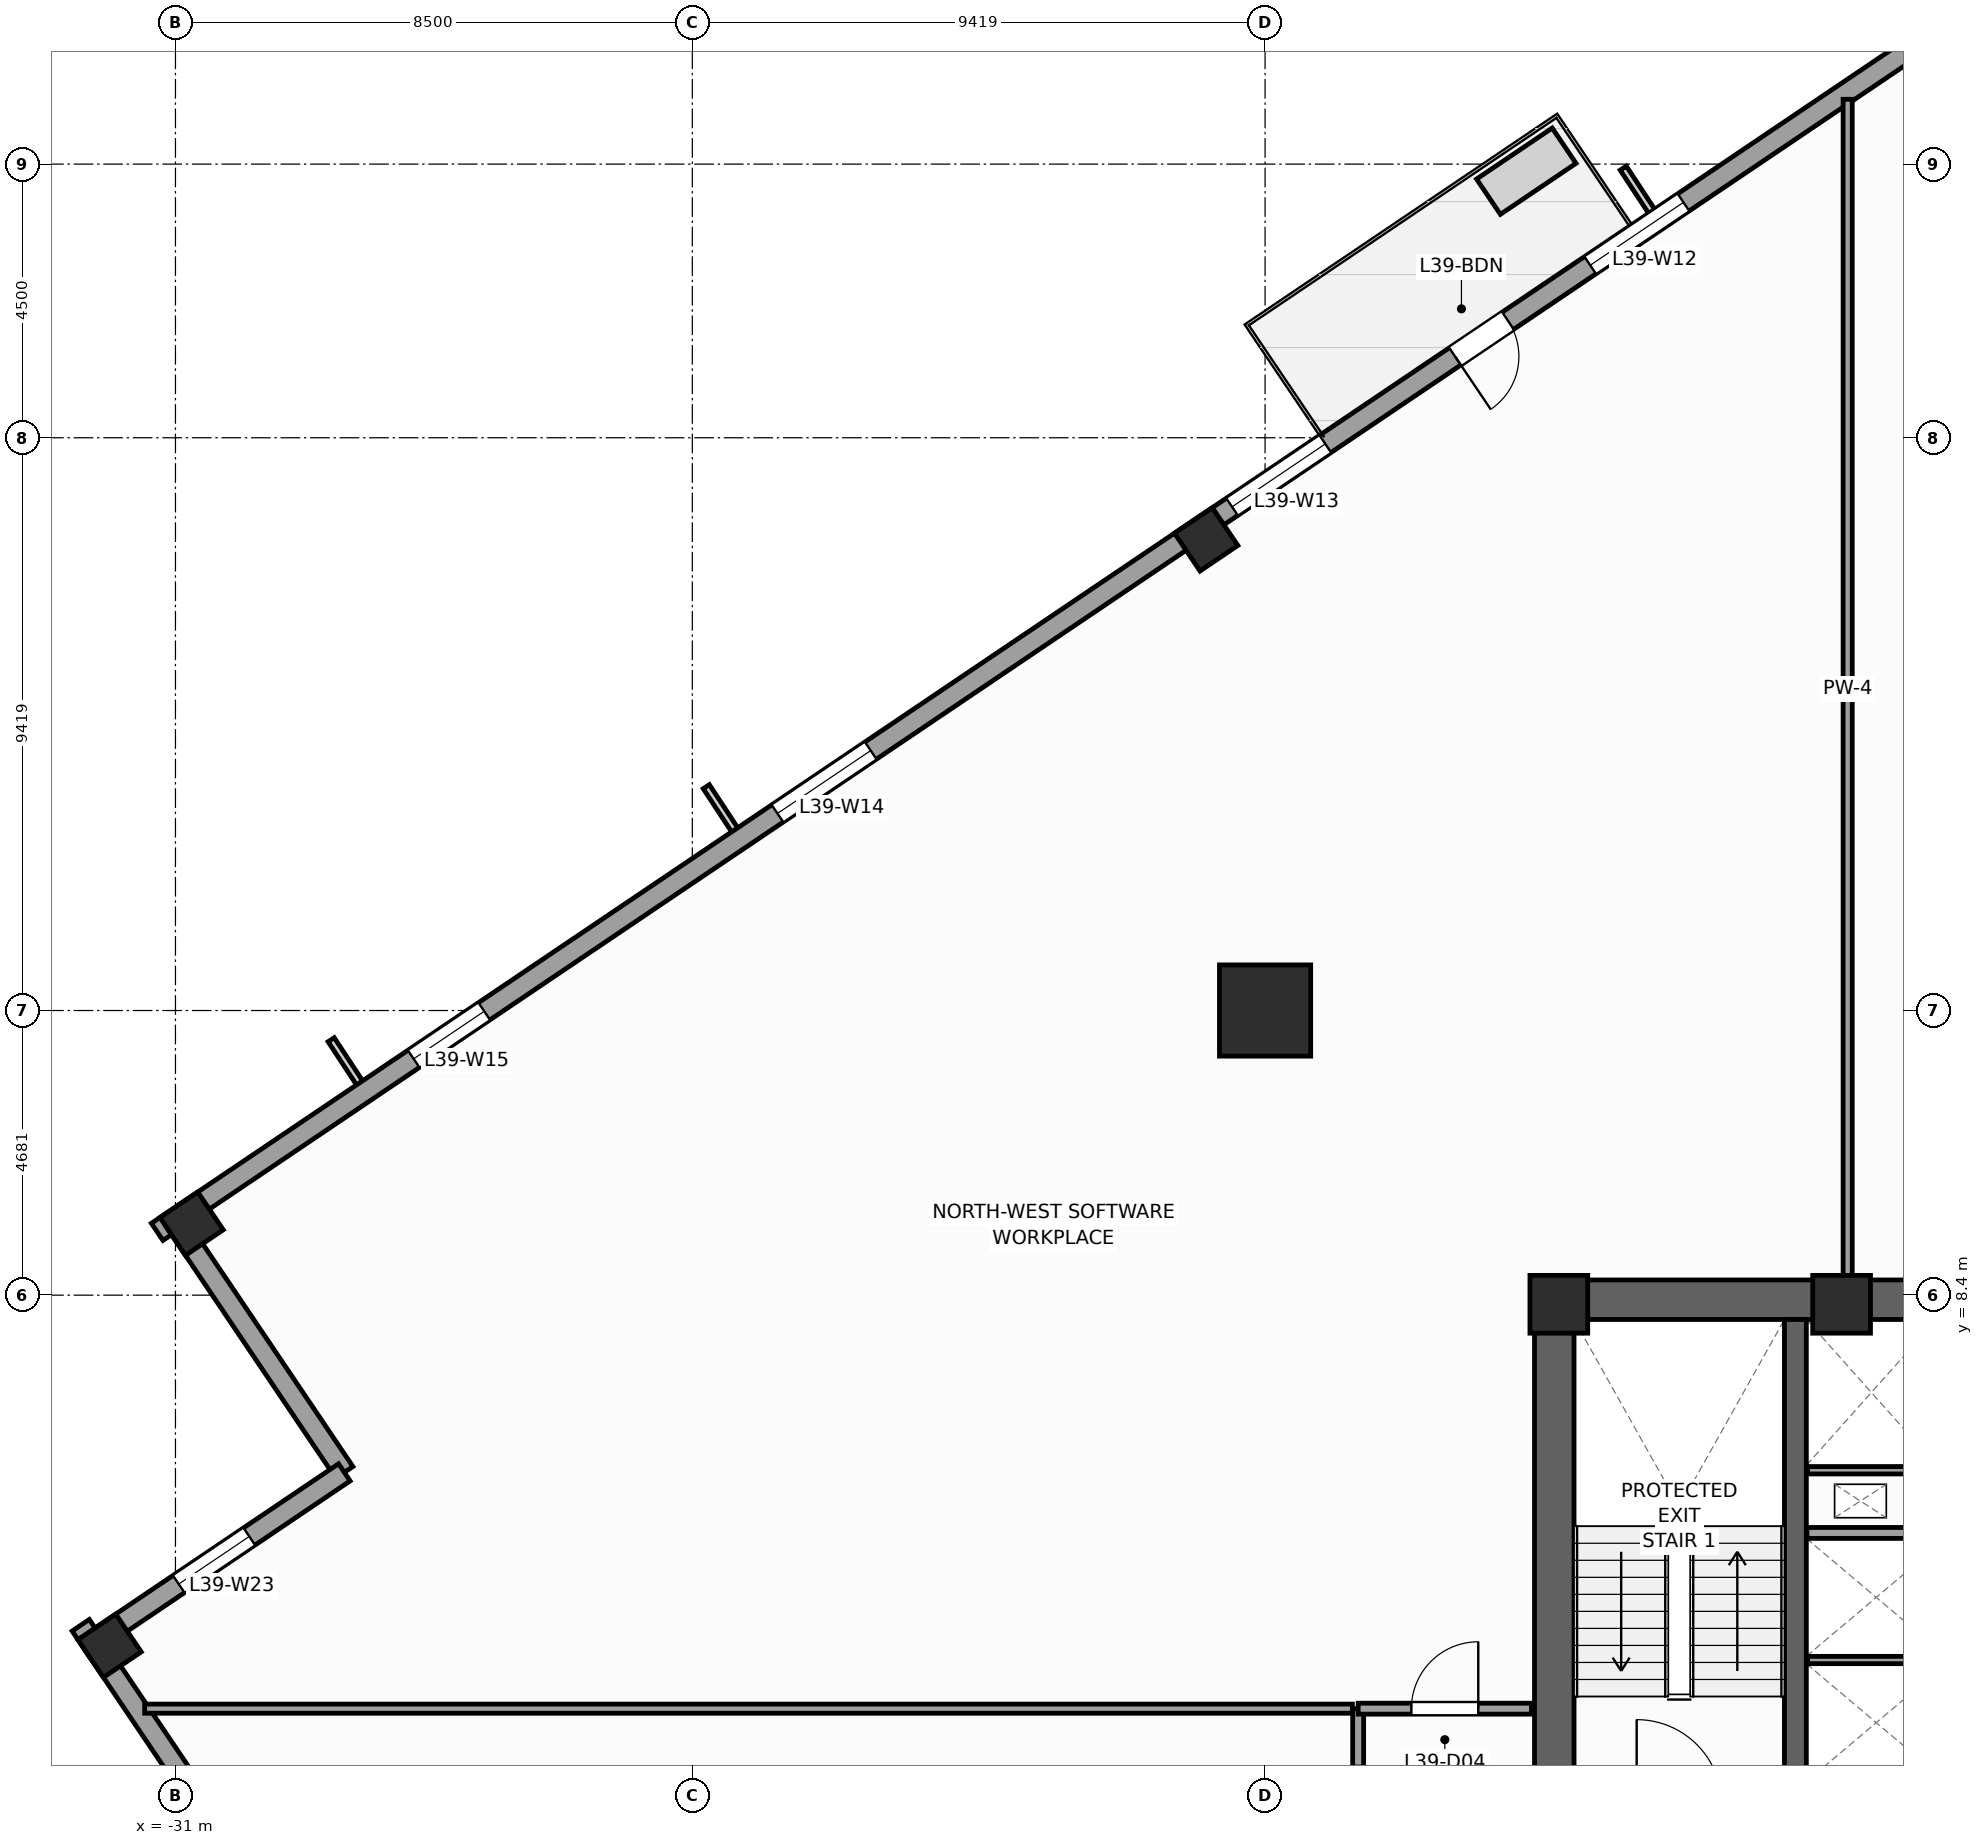
"""IFC4 building model, lengths in metres.
Left out: names, types, materials, properties, quantities, classifications, styles, units other than length and angle.
Written with IfcOpenShell. Run it as: python <this file> out.ifc"""

import sys

from ifc_helpers import new_model, si_unit, direction, frame, frame_2d, origin, origin_2d, place, context, subcontext, project, spatial, rectangle, extrude, source, transform, mapped, element, fill, save


model = new_model("IFC4")
c1 = context("Model", 3, precision=1e-05, world=origin(), true_north=direction((0.0, 1.0)))
c2 = subcontext(c1, "Body", "Model", "MODEL_VIEW")
j1 = project(units=[si_unit("LENGTHUNIT", "METRE"), si_unit("PLANEANGLEUNIT", "RADIAN")], contexts=[c1])
p1 = place(None, origin())
s1 = spatial("IfcSite", under=j1, at=p1, CompositionType="ELEMENT")
p2 = place(p1, origin())
s2 = spatial("IfcBuilding", under=s1, at=p2, CompositionType="ELEMENT")
p3 = place(p2, frame((0.0, 0.0, 164.4)))
s3 = spatial("IfcBuildingStorey", under=s2, at=p3, CompositionType="ELEMENT", Elevation=164.4)
p4 = place(p3, frame((-8.65, 8.325, 0.0), z_axis=(0.0, 0.0, 1.0), x_axis=(1.0, 0.0, 0.0)))
e1 = element("IfcWall", 1, at=p4, inside=s3, PredefinedType="SHEAR", context=c2, shape_type="SweptSolid", body=[
    extrude(rectangle(XDim=17.3, YDim=0.65, at=frame_2d((8.65, 0.0))), origin(), (0.0, 0.0, 1.0), 4.0),
])
p5 = place(p3, frame((-8.325, -8.0, 0.0), z_axis=(0.0, 0.0, 1.0), x_axis=(0.0, 1.0, 0.0)))
e2 = element("IfcWall", 2, at=p5, inside=s3, PredefinedType="SHEAR", context=c2, shape_type="SweptSolid", body=[
    extrude(rectangle(XDim=16.0, YDim=0.65, at=frame_2d((8.0, 0.0))), origin(), (0.0, 0.0, 1.0), 4.0),
])
p6 = place(p5, frame((4.69, 0.0, 0.0)))
e3 = element("IfcOpeningElement", 3, at=p6, cuts=e2, PredefinedType="OPENING", context=c2, shape_type="SweptSolid", body=[
    extrude(rectangle(XDim=1.3, YDim=2.2, at=frame_2d((0.65, 1.1))), frame((0.0, 0.335, 0.0), z_axis=(0.0, -1.0, 0.0), x_axis=(1.0, 0.0, 0.0)), (0.0, 0.0, 1.0), 0.67),
])
p7 = place(p3, frame((-4.36, -8.0, 0.0), z_axis=(0.0, 0.0, 1.0), x_axis=(0.0, 1.0, 0.0)))
e4 = element("IfcWall", 4, at=p7, inside=s3, PredefinedType="SHEAR", context=c2, shape_type="SweptSolid", body=[
    extrude(rectangle(XDim=16.0, YDim=0.36, at=frame_2d((8.0, 0.0))), origin(), (0.0, 0.0, 1.0), 4.0),
])
m1 = source(origin(), c2, "Body", "SweptSolid", [
    extrude(rectangle(XDim=0.95, YDim=0.95, at=origin_2d()), origin(), (0.0, 0.0, 1.0), 4.0),
])
for number, where, z_axis, x_axis in (
    (5, (-8.25, 8.25, 0.0), (0.0, 0.0, 1.0), (1.0, 0.0, 0.0)),
    (6, (-3.6, 8.25, 0.0), (0.0, 0.0, 1.0), (1.0, 0.0, 0.0)),
):
    element("IfcColumn", number, at=place(p3, frame(where, z_axis=z_axis, x_axis=x_axis)), inside=s3, PredefinedType="PILASTER", context=c2, shape_type="MappedRepresentation", body=[
        mapped(m1, transform((0.0, 0.0, 0.0), scale=1.0)),
    ])
m2 = source(origin(), c2, "Body", "SweptSolid", [
    extrude(rectangle(XDim=1.5, YDim=1.5, at=origin_2d()), origin(), (0.0, 0.0, 1.0), 4.0),
])
p8 = place(p3, frame((-13.081, 13.081, 0.0), z_axis=(0.0, 0.0, 1.0), x_axis=(1.0, 0.0, 0.0)))
e7 = element("IfcColumn", 7, at=p8, inside=s3, PredefinedType="COLUMN", context=c2, shape_type="MappedRepresentation", body=[
    mapped(m2, transform((0.0, 0.0, 0.0), scale=1.0)),
])
m3 = source(origin(), c2, "Body", "SweptSolid", [
    extrude(rectangle(XDim=0.75, YDim=0.75, at=origin_2d()), origin(), (0.0, 0.0, 1.0), 4.0),
])
for number, where, z_axis, x_axis in (
    (8, (-14.05, 20.83, 0.0), (0.0, 0.0, 1.0), (0.829, 0.559, 0.0)),
    (9, (-30.734, 9.576, 0.0), (0.0, 0.0, 1.0), (0.829, 0.559, 0.0)),
    (10, (-32.083, 2.635, 0.0), (0.0, 0.0, 1.0), (0.829, 0.559, 0.0)),
):
    element("IfcColumn", number, at=place(p3, frame(where, z_axis=z_axis, x_axis=x_axis)), inside=s3, PredefinedType="COLUMN", context=c2, shape_type="MappedRepresentation", body=[
        mapped(m3, transform((0.0, 0.0, 0.0), scale=1.0)),
    ])
p9 = place(p3, frame((2.972, 32.558, 0.0), z_axis=(0.0, 0.0, 1.0), x_axis=(-0.829036218961, -0.559194910251, 0.0)))
e11 = element("IfcWall", 11, at=p9, inside=s3, PredefinedType="STANDARD", context=c2, shape_type="SweptSolid", body=[
    extrude(rectangle(XDim=41.34, YDim=0.34, at=frame_2d((20.67, 0.0))), origin(), (0.0, 0.0, 1.0), 3.04),
])
p10 = place(p9, frame((14.545, 0.0, 0.0)))
e12 = element("IfcOpeningElement", 12, at=p10, cuts=e11, PredefinedType="OPENING", context=c2, shape_type="SweptSolid", body=[
    extrude(rectangle(XDim=1.05, YDim=2.25, at=frame_2d((0.525, 1.125))), frame((0.0, 0.18, 0.0), z_axis=(0.0, -1.0, 0.0), x_axis=(1.0, 0.0, 0.0)), (0.0, 0.0, 1.0), 0.36),
])
p11 = place(p9, frame((4.261, 0.0, 0.56)))
e13 = element("IfcOpeningElement", 13, at=p11, cuts=e11, PredefinedType="OPENING", context=c2, shape_type="SweptSolid", body=[
    extrude(rectangle(XDim=1.4, YDim=2.4, at=frame_2d((0.7, 1.2))), frame((0.0, 0.18, 0.0), z_axis=(0.0, -1.0, 0.0), x_axis=(1.0, 0.0, 0.0)), (0.0, 0.0, 1.0), 0.36),
])
p12 = place(p9, frame((11.064, 0.0, 0.61)))
e14 = element("IfcOpeningElement", 14, at=p12, cuts=e11, PredefinedType="OPENING", context=c2, shape_type="SweptSolid", body=[
    extrude(rectangle(XDim=1.85, YDim=2.35, at=frame_2d((0.925, 1.175))), frame((0.0, 0.18, 0.0), z_axis=(0.0, -1.0, 0.0), x_axis=(1.0, 0.0, 0.0)), (0.0, 0.0, 1.0), 0.36),
])
p13 = place(p9, frame((18.168, 0.0, 0.61)))
e15 = element("IfcOpeningElement", 15, at=p13, cuts=e11, PredefinedType="OPENING", context=c2, shape_type="SweptSolid", body=[
    extrude(rectangle(XDim=1.85, YDim=2.35, at=frame_2d((0.925, 1.175))), frame((0.0, 0.18, 0.0), z_axis=(0.0, -1.0, 0.0), x_axis=(1.0, 0.0, 0.0)), (0.0, 0.0, 1.0), 0.36),
])
p14 = place(p9, frame((27.186, 0.0, 0.61)))
e16 = element("IfcOpeningElement", 16, at=p14, cuts=e11, PredefinedType="OPENING", context=c2, shape_type="SweptSolid", body=[
    extrude(rectangle(XDim=1.85, YDim=2.35, at=frame_2d((0.925, 1.175))), frame((0.0, 0.18, 0.0), z_axis=(0.0, -1.0, 0.0), x_axis=(1.0, 0.0, 0.0)), (0.0, 0.0, 1.0), 0.36),
])
p15 = place(p9, frame((34.852, 0.0, 0.56)))
e17 = element("IfcOpeningElement", 17, at=p15, cuts=e11, PredefinedType="OPENING", context=c2, shape_type="SweptSolid", body=[
    extrude(rectangle(XDim=1.4, YDim=2.4, at=frame_2d((0.7, 1.2))), frame((0.0, 0.18, 0.0), z_axis=(0.0, -1.0, 0.0), x_axis=(1.0, 0.0, 0.0)), (0.0, 0.0, 1.0), 0.36),
])
p16 = place(p3, frame((-31.019, 9.631, 0.0), z_axis=(0.0, 0.0, 1.0), x_axis=(0.559210350234, -0.829025804298, 0.0)))
e18 = element("IfcWall", 18, at=p16, inside=s3, PredefinedType="STANDARD", context=c2, shape_type="SweptSolid", body=[
    extrude(rectangle(XDim=5.0, YDim=0.34, at=frame_2d((2.5, 0.0))), origin(), (0.0, 0.0, 1.0), 3.74),
])
p17 = place(p3, frame((-28.223, 5.486, 0.0), z_axis=(0.0, 0.0, 1.0), x_axis=(-0.82905227345, -0.559171107879, 0.0)))
e19 = element("IfcWall", 19, at=p17, inside=s3, PredefinedType="STANDARD", context=c2, shape_type="SweptSolid", body=[
    extrude(rectangle(XDim=5.17, YDim=0.34, at=frame_2d((2.585, 0.0))), origin(), (0.0, 0.0, 1.0), 3.04),
])
p18 = place(p17, frame((1.885, 0.0, 0.56)))
e20 = element("IfcOpeningElement", 20, at=p18, cuts=e19, PredefinedType="OPENING", context=c2, shape_type="SweptSolid", body=[
    extrude(rectangle(XDim=1.4, YDim=2.4, at=frame_2d((0.7, 1.2))), frame((0.0, 0.18, 0.0), z_axis=(0.0, -1.0, 0.0), x_axis=(1.0, 0.0, 0.0)), (0.0, 0.0, 1.0), 0.36),
])
p19 = place(p3, frame((-32.558, 2.972, 0.0), z_axis=(0.0, 0.0, 1.0), x_axis=(0.559194910251, -0.829036218961, 0.0)))
e21 = element("IfcWall", 21, at=p19, inside=s3, PredefinedType="STANDARD", context=c2, shape_type="SweptSolid", body=[
    extrude(rectangle(XDim=41.34, YDim=0.34, at=frame_2d((20.67, 0.0))), origin(), (0.0, 0.0, 1.0), 3.04),
])
p20 = place(p19, frame((5.761, 0.0, 0.56)))
e22 = element("IfcOpeningElement", 22, at=p20, cuts=e21, PredefinedType="OPENING", context=c2, shape_type="SweptSolid", body=[
    extrude(rectangle(XDim=1.4, YDim=2.4, at=frame_2d((0.7, 1.2))), frame((0.0, 0.18, 0.0), z_axis=(0.0, -1.0, 0.0), x_axis=(1.0, 0.0, 0.0)), (0.0, 0.0, 1.0), 0.36),
])
p21 = place(p19, frame((11.064, 0.0, 0.61)))
e23 = element("IfcOpeningElement", 23, at=p21, cuts=e21, PredefinedType="OPENING", context=c2, shape_type="SweptSolid", body=[
    extrude(rectangle(XDim=1.85, YDim=2.35, at=frame_2d((0.925, 1.175))), frame((0.0, 0.18, 0.0), z_axis=(0.0, -1.0, 0.0), x_axis=(1.0, 0.0, 0.0)), (0.0, 0.0, 1.0), 0.36),
])
p22 = place(p19, frame((18.168, 0.0, 0.61)))
e24 = element("IfcOpeningElement", 24, at=p22, cuts=e21, PredefinedType="OPENING", context=c2, shape_type="SweptSolid", body=[
    extrude(rectangle(XDim=1.85, YDim=2.35, at=frame_2d((0.925, 1.175))), frame((0.0, 0.18, 0.0), z_axis=(0.0, -1.0, 0.0), x_axis=(1.0, 0.0, 0.0)), (0.0, 0.0, 1.0), 0.36),
])
p23 = place(p19, frame((27.186, 0.0, 0.61)))
e25 = element("IfcOpeningElement", 25, at=p23, cuts=e21, PredefinedType="OPENING", context=c2, shape_type="SweptSolid", body=[
    extrude(rectangle(XDim=1.85, YDim=2.35, at=frame_2d((0.925, 1.175))), frame((0.0, 0.18, 0.0), z_axis=(0.0, -1.0, 0.0), x_axis=(1.0, 0.0, 0.0)), (0.0, 0.0, 1.0), 0.36),
])
p24 = place(p19, frame((35.602, 0.0, 0.56)))
e26 = element("IfcOpeningElement", 26, at=p24, cuts=e21, PredefinedType="OPENING", context=c2, shape_type="SweptSolid", body=[
    extrude(rectangle(XDim=1.4, YDim=2.4, at=frame_2d((0.7, 1.2))), frame((0.0, 0.18, 0.0), z_axis=(0.0, -1.0, 0.0), x_axis=(1.0, 0.0, 0.0)), (0.0, 0.0, 1.0), 0.36),
])
p25 = place(p3, frame((-4.17, 4.49, 0.0), z_axis=(0.0, 0.0, 1.0), x_axis=(1.0, 0.0, 0.0)))
e27 = element("IfcWall", 27, at=p25, inside=s3, PredefinedType="PARTITIONING", context=c2, shape_type="SweptSolid", body=[
    extrude(rectangle(XDim=2.28, YDim=0.18, at=frame_2d((1.14, 0.0))), origin(), (0.0, 0.0, 1.0), 3.74),
])
p26 = place(p3, frame((-4.16, 2.4, 0.0), z_axis=(0.0, 0.0, 1.0), x_axis=(1.0, 0.0, 0.0)))
e28 = element("IfcWall", 28, at=p26, inside=s3, PredefinedType="PARTITIONING", context=c2, shape_type="SweptSolid", body=[
    extrude(rectangle(XDim=2.26, YDim=0.12, at=frame_2d((1.13, 0.0))), origin(), (0.0, 0.0, 1.0), 3.74),
])
p27 = place(p3, frame((-4.16, 5.52, 0.0), z_axis=(0.0, 0.0, 1.0), x_axis=(1.0, 0.0, 0.0)))
e29 = element("IfcWall", 29, at=p27, inside=s3, PredefinedType="PARTITIONING", context=c2, shape_type="SweptSolid", body=[
    extrude(rectangle(XDim=2.1, YDim=0.12, at=frame_2d((1.05, 0.0))), origin(), (0.0, 0.0, 1.0), 3.74),
])
p28 = place(p3, frame((-11.55, -11.45, 0.0), z_axis=(0.0, 0.0, 1.0), x_axis=(0.0, 1.0, 0.0)))
e30 = element("IfcWall", 30, at=p28, inside=s3, PredefinedType="PARTITIONING", context=c2, shape_type="SweptSolid", body=[
    extrude(rectangle(XDim=13.05, YDim=0.18, at=frame_2d((6.525, 0.0))), origin(), (0.0, 0.0, 1.0), 3.74),
])
p29 = place(p28, frame((4.086, 0.0, 0.0)))
e31 = element("IfcOpeningElement", 31, at=p29, cuts=e30, PredefinedType="OPENING", context=c2, shape_type="SweptSolid", body=[
    extrude(rectangle(XDim=0.95, YDim=2.1, at=frame_2d((0.475, 1.05))), frame((0.0, 0.1, 0.0), z_axis=(0.0, -1.0, 0.0), x_axis=(1.0, 0.0, 0.0)), (0.0, 0.0, 1.0), 0.2),
])
p30 = place(p28, frame((11.01, 0.0, 0.0)))
e32 = element("IfcOpeningElement", 32, at=p30, cuts=e30, PredefinedType="OPENING", context=c2, shape_type="SweptSolid", body=[
    extrude(rectangle(XDim=1.1, YDim=2.2, at=frame_2d((0.55, 1.1))), frame((0.0, 0.1, 0.0), z_axis=(0.0, -1.0, 0.0), x_axis=(1.0, 0.0, 0.0)), (0.0, 0.0, 1.0), 0.2),
])
p31 = place(p28, frame((8.775, 0.0, 0.0)))
e33 = element("IfcOpeningElement", 33, at=p31, cuts=e30, PredefinedType="OPENING", context=c2, shape_type="SweptSolid", body=[
    extrude(rectangle(XDim=1.1, YDim=2.2, at=frame_2d((0.55, 1.1))), frame((0.0, 0.1, 0.0), z_axis=(0.0, -1.0, 0.0), x_axis=(1.0, 0.0, 0.0)), (0.0, 0.0, 1.0), 0.2),
])
p32 = place(p28, frame((6.35, 0.0, 0.0)))
e34 = element("IfcOpeningElement", 34, at=p32, cuts=e30, PredefinedType="OPENING", context=c2, shape_type="SweptSolid", body=[
    extrude(rectangle(XDim=1.1, YDim=2.2, at=frame_2d((0.55, 1.1))), frame((0.0, 0.1, 0.0), z_axis=(0.0, -1.0, 0.0), x_axis=(1.0, 0.0, 0.0)), (0.0, 0.0, 1.0), 0.2),
])
p33 = place(p28, frame((1.24, 0.0, 0.0)))
e35 = element("IfcOpeningElement", 35, at=p33, cuts=e30, PredefinedType="OPENING", context=c2, shape_type="SweptSolid", body=[
    extrude(rectangle(XDim=1.1, YDim=2.2, at=frame_2d((0.55, 1.1))), frame((0.0, 0.1, 0.0), z_axis=(0.0, -1.0, 0.0), x_axis=(1.0, 0.0, 0.0)), (0.0, 0.0, 1.0), 0.2),
])
p34 = place(p3, frame((-11.55, 1.6, 0.0), z_axis=(0.0, 0.0, 1.0), x_axis=(1.0, 0.0, 0.0)))
e36 = element("IfcWall", 36, at=p34, inside=s3, PredefinedType="PARTITIONING", context=c2, shape_type="SweptSolid", body=[
    extrude(rectangle(XDim=2.85, YDim=0.18, at=frame_2d((1.425, 0.0))), origin(), (0.0, 0.0, 1.0), 3.74),
])
p35 = place(p34, frame((0.875, 0.0, 0.0)))
e37 = element("IfcOpeningElement", 37, at=p35, cuts=e36, PredefinedType="OPENING", context=c2, shape_type="SweptSolid", body=[
    extrude(rectangle(XDim=1.1, YDim=2.2, at=frame_2d((0.55, 1.1))), frame((0.0, 0.1, 0.0), z_axis=(0.0, -1.0, 0.0), x_axis=(1.0, 0.0, 0.0)), (0.0, 0.0, 1.0), 0.2),
])
p36 = place(p3, frame((-3.5, 8.655, 0.0), z_axis=(0.0, 0.0, 1.0), x_axis=(0.0, 1.0, 0.0)))
e38 = element("IfcWall", 38, at=p36, inside=s3, PredefinedType="PARTITIONING", context=c2, shape_type="SweptSolid", body=[
    extrude(rectangle(XDim=19.411, YDim=0.15, at=frame_2d((9.706, 0.0))), origin(), (0.0, 0.0, 1.0), 3.74),
])
p37 = place(p3, frame((-31.506, 1.6, 0.0), z_axis=(0.0, 0.0, 1.0), x_axis=(1.0, 0.0, 0.0)))
e39 = element("IfcWall", 39, at=p37, inside=s3, PredefinedType="PARTITIONING", context=c2, shape_type="SweptSolid", body=[
    extrude(rectangle(XDim=19.861, YDim=0.15, at=frame_2d((9.931, 0.0))), origin(), (0.0, 0.0, 1.0), 3.74),
])
m4 = source(origin(), c2, "Body", "SweptSolid", [
    extrude(rectangle(XDim=1.05, YDim=2.25, at=frame_2d((0.525, 1.125))), frame((0.0, 0.025, 0.0), z_axis=(0.0, -1.0, 0.0), x_axis=(1.0, 0.0, 0.0)), (0.0, 0.0, 1.0), 0.05),
])
p38 = place(p10, origin())
e40 = element("IfcDoor", 40, at=p38, inside=s3, OperationType="SINGLE_SWING_RIGHT", PredefinedType="DOOR", context=c2, shape_type="MappedRepresentation", body=[
    mapped(m4, transform((0.0, 0.0, 0.0), scale=1.0)),
])
fill(e12, e40)
m5 = source(origin(), c2, "Body", "SweptSolid", [
    extrude(rectangle(XDim=1.85, YDim=2.35, at=frame_2d((0.925, 1.175))), frame((0.0, 0.03, 0.0), z_axis=(0.0, -1.0, 0.0), x_axis=(1.0, 0.0, 0.0)), (0.0, 0.0, 1.0), 0.06),
])
p39 = place(p12, origin())
e41 = element("IfcWindow", 41, at=p39, inside=s3, PartitioningType="SINGLE_PANEL", PredefinedType="WINDOW", context=c2, shape_type="MappedRepresentation", body=[
    mapped(m5, transform((0.0, 0.0, 0.0), scale=1.0)),
])
fill(e14, e41)
p40 = place(p13, origin())
e42 = element("IfcWindow", 42, at=p40, inside=s3, PartitioningType="SINGLE_PANEL", PredefinedType="WINDOW", context=c2, shape_type="MappedRepresentation", body=[
    mapped(m5, transform((0.0, 0.0, 0.0), scale=1.0)),
])
fill(e15, e42)
p41 = place(p14, origin())
e43 = element("IfcWindow", 43, at=p41, inside=s3, PartitioningType="SINGLE_PANEL", PredefinedType="WINDOW", context=c2, shape_type="MappedRepresentation", body=[
    mapped(m5, transform((0.0, 0.0, 0.0), scale=1.0)),
])
fill(e16, e43)
m6 = source(origin(), c2, "Body", "SweptSolid", [
    extrude(rectangle(XDim=1.4, YDim=2.4, at=frame_2d((0.7, 1.2))), frame((0.0, 0.03, 0.0), z_axis=(0.0, -1.0, 0.0), x_axis=(1.0, 0.0, 0.0)), (0.0, 0.0, 1.0), 0.06),
])
p42 = place(p15, origin())
e44 = element("IfcWindow", 44, at=p42, inside=s3, PartitioningType="SINGLE_PANEL", PredefinedType="WINDOW", context=c2, shape_type="MappedRepresentation", body=[
    mapped(m6, transform((0.0, 0.0, 0.0), scale=1.0)),
])
fill(e17, e44)
p43 = place(p18, origin())
e45 = element("IfcWindow", 45, at=p43, inside=s3, PartitioningType="SINGLE_PANEL", PredefinedType="WINDOW", context=c2, shape_type="MappedRepresentation", body=[
    mapped(m6, transform((0.0, 0.0, 0.0), scale=1.0)),
])
fill(e20, e45)
m7 = source(origin(), c2, "Body", "SweptSolid", [
    extrude(rectangle(XDim=1.1, YDim=2.2, at=frame_2d((0.55, 1.1))), frame((0.0, 0.025, 0.0), z_axis=(0.0, -1.0, 0.0), x_axis=(1.0, 0.0, 0.0)), (0.0, 0.0, 1.0), 0.05),
])
p44 = place(p35, origin())
e46 = element("IfcDoor", 46, at=p44, inside=s3, OperationType="SINGLE_SWING_RIGHT", PredefinedType="DOOR", context=c2, shape_type="MappedRepresentation", body=[
    mapped(m7, transform((0.0, 0.0, 0.0), scale=1.0)),
])
fill(e37, e46)
save(model, sys.argv[1])
